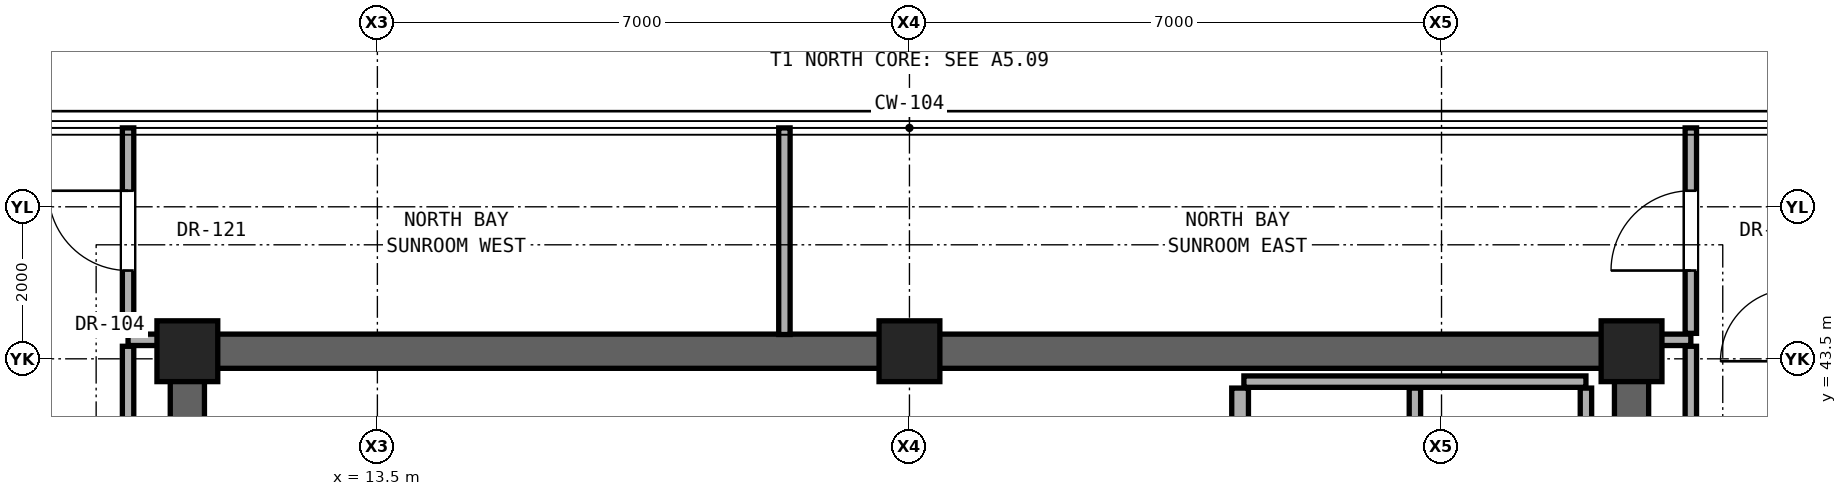
"""IFC4 building model, lengths in metres.
Left out: names, types, materials, properties, quantities, classifications, styles, units other than length and angle.
Written with IfcOpenShell. Run it as: python <this file> out.ifc"""

import sys

from ifc_helpers import new_model, si_unit, direction, frame, frame_2d, origin, origin_2d, place, context, subcontext, project, spatial, rectangle, extrude, element, fill, save


model = new_model("IFC4")
c1 = context("Model", 3, precision=1e-05, world=origin(), true_north=direction((0.0, 1.0)))
c2 = subcontext(c1, "Body", "Model", "MODEL_VIEW")
j1 = project(units=[si_unit("LENGTHUNIT", "METRE"), si_unit("PLANEANGLEUNIT", "RADIAN")], contexts=[c1])
p1 = place(None, origin())
s1 = spatial("IfcSite", under=j1, at=p1, CompositionType="ELEMENT")
p2 = place(p1, origin())
s2 = spatial("IfcBuilding", under=s1, at=p2, CompositionType="ELEMENT")
p3 = place(p2, frame((0.0, 0.0, 222.7)))
s3 = spatial("IfcBuildingStorey", under=s2, at=p3, CompositionType="ELEMENT", Elevation=222.7)
for number, where, z_axis, x_axis in (
    (1, (11.0, 43.6, 0.0), (0.0, 0.0, 1.0), (1.0, 0.0, 0.0)),
    (2, (20.5, 43.6, 0.0), (0.0, 0.0, 1.0), (1.0, 0.0, 0.0)),
    (3, (30.0, 43.6, 0.0), (0.0, 0.0, 1.0), (1.0, 0.0, 0.0)),
):
    element("IfcColumn", number, at=place(p3, frame(where, z_axis=z_axis, x_axis=x_axis)), inside=s3, PredefinedType="COLUMN", context=c2, shape_type="SweptSolid", body=[
        extrude(rectangle(XDim=0.8, YDim=0.8, at=origin_2d()), origin(), (0.0, 0.0, 1.0), 3.3),
    ])
p4 = place(p3, frame((11.0, 43.6, 0.0), z_axis=(0.0, 0.0, 1.0), x_axis=(1.0, 0.0, 0.0)))
e4 = element("IfcWall", 4, at=p4, inside=s3, PredefinedType="SHEAR", context=c2, shape_type="SweptSolid", body=[
    extrude(rectangle(XDim=19.0, YDim=0.45, at=frame_2d((9.5, 0.0))), origin(), (0.0, 0.0, 1.0), 3.1),
])
for number, where, z_axis, x_axis in (
    (5, (11.0, 37.6, 0.0), (0.0, 0.0, 1.0), (0.0, 1.0, 0.0)),
    (6, (30.0, 37.6, 0.0), (0.0, 0.0, 1.0), (0.0, 1.0, 0.0)),
):
    element("IfcWall", number, at=place(p3, frame(where, z_axis=z_axis, x_axis=x_axis)), inside=s3, PredefinedType="SHEAR", context=c2, shape_type="SweptSolid", body=[
        extrude(rectangle(XDim=6.0, YDim=0.45, at=frame_2d((3.0, 0.0))), origin(), (0.0, 0.0, 1.0), 3.1),
    ])
p5 = place(p3, frame((24.9, 43.2, 0.0), z_axis=(0.0, 0.0, 1.0), x_axis=(1.0, 0.0, 0.0)))
e7 = element("IfcWall", 7, at=p5, inside=s3, PredefinedType="PARTITIONING", context=c2, shape_type="SweptSolid", body=[
    extrude(rectangle(XDim=4.5, YDim=0.15, at=frame_2d((2.25, 0.0))), origin(), (0.0, 0.0, 1.0), 3.1),
])
for number, where, z_axis, x_axis in (
    (8, (10.22, 43.75, 0.0), (0.0, 0.0, 1.0), (1.0, 0.0, 0.0)),
    (9, (30.22, 43.75, 0.0), (0.0, 0.0, 1.0), (1.0, 0.0, 0.0)),
):
    element("IfcWall", number, at=place(p3, frame(where, z_axis=z_axis, x_axis=x_axis)), inside=s3, PredefinedType="PARTITIONING", context=c2, shape_type="SweptSolid", body=[
        extrude(rectangle(XDim=0.56, YDim=0.15, at=frame_2d((0.28, 0.0))), origin(), (0.0, 0.0, 1.0), 3.1),
    ])
p6 = place(p3, frame((10.22, 34.535, 0.0), z_axis=(0.0, 0.0, 1.0), x_axis=(0.0, 1.0, 0.0)))
e10 = element("IfcWall", 10, at=p6, inside=s3, PredefinedType="PARTITIONING", context=c2, shape_type="SweptSolid", body=[
    extrude(rectangle(XDim=9.13, YDim=0.15, at=frame_2d((4.565, 0.0))), origin(), (0.0, 0.0, 1.0), 2.492),
])
p7 = place(p3, frame((10.22, 43.835, 0.0), z_axis=(0.0, 0.0, 1.0), x_axis=(0.0, 1.0, 0.0)))
e11 = element("IfcWall", 11, at=p7, inside=s3, PredefinedType="PARTITIONING", context=c2, shape_type="SweptSolid", body=[
    extrude(rectangle(XDim=2.703, YDim=0.15, at=frame_2d((1.352, 0.0))), origin(), (0.0, 0.0, 1.0), 3.1),
])
p8 = place(p7, frame((0.826, 0.0, 0.0)))
e12 = element("IfcOpeningElement", 12, at=p8, cuts=e11, PredefinedType="OPENING", context=c2, shape_type="SweptSolid", body=[
    extrude(rectangle(XDim=1.05, YDim=2.2, at=frame_2d((0.525, 1.1))), frame((0.0, 0.085, 0.0), z_axis=(0.0, -1.0, 0.0), x_axis=(1.0, 0.0, 0.0)), (0.0, 0.0, 1.0), 0.17),
])
p9 = place(p3, frame((18.855, 43.82, 0.0), z_axis=(0.0, 0.0, 1.0), x_axis=(0.0, 1.0, 0.0)))
e13 = element("IfcWall", 13, at=p9, inside=s3, PredefinedType="PARTITIONING", context=c2, shape_type="SweptSolid", body=[
    extrude(rectangle(XDim=2.718, YDim=0.15, at=frame_2d((1.359, 0.0))), origin(), (0.0, 0.0, 1.0), 3.1),
])
p10 = place(p3, frame((24.85, 40.26, 0.0), z_axis=(0.0, 0.0, 1.0), x_axis=(0.0, 1.0, 0.0)))
e14 = element("IfcWall", 14, at=p10, inside=s3, PredefinedType="SOLIDWALL", context=c2, shape_type="SweptSolid", body=[
    extrude(rectangle(XDim=2.855, YDim=0.22, at=frame_2d((1.427, 0.0))), origin(), (0.0, 0.0, 1.0), 3.1),
])
for number, where, z_axis, x_axis in (
    (15, (27.15, 37.82, 0.0), (0.0, 0.0, 1.0), (0.0, 1.0, 0.0)),
    (16, (29.4, 37.82, 0.0), (0.0, 0.0, 1.0), (0.0, 1.0, 0.0)),
):
    element("IfcWall", number, at=place(p3, frame(where, z_axis=z_axis, x_axis=x_axis)), inside=s3, PredefinedType="PARTITIONING", context=c2, shape_type="SweptSolid", body=[
        extrude(rectangle(XDim=5.295, YDim=0.15, at=frame_2d((2.647, 0.0))), origin(), (0.0, 0.0, 1.0), 3.1),
    ])
p11 = place(p3, frame((30.78, 34.57, 0.0), z_axis=(0.0, 0.0, 1.0), x_axis=(0.0, 1.0, 0.0)))
e17 = element("IfcWall", 17, at=p11, inside=s3, PredefinedType="PARTITIONING", context=c2, shape_type="SweptSolid", body=[
    extrude(rectangle(XDim=9.095, YDim=0.15, at=frame_2d((4.547, 0.0))), origin(), (0.0, 0.0, 1.0), 2.492),
])
p12 = place(p3, frame((30.78, 43.835, 0.0), z_axis=(0.0, 0.0, 1.0), x_axis=(0.0, 1.0, 0.0)))
e18 = element("IfcWall", 18, at=p12, inside=s3, PredefinedType="PARTITIONING", context=c2, shape_type="SweptSolid", body=[
    extrude(rectangle(XDim=2.703, YDim=0.15, at=frame_2d((1.352, 0.0))), origin(), (0.0, 0.0, 1.0), 3.1),
])
p13 = place(p12, frame((0.826, 0.0, 0.0)))
e19 = element("IfcOpeningElement", 19, at=p13, cuts=e18, PredefinedType="OPENING", context=c2, shape_type="SweptSolid", body=[
    extrude(rectangle(XDim=1.05, YDim=2.2, at=frame_2d((0.525, 1.1))), frame((0.0, 0.085, 0.0), z_axis=(0.0, -1.0, 0.0), x_axis=(1.0, 0.0, 0.0)), (0.0, 0.0, 1.0), 0.17),
])
p14 = place(p8, origin())
e20 = element("IfcDoor", 20, at=p14, inside=s3, OperationType="SINGLE_SWING_RIGHT", PredefinedType="DOOR", context=c2, shape_type="SweptSolid", body=[
    extrude(rectangle(XDim=1.05, YDim=2.2, at=frame_2d((0.525, 1.1))), frame((0.0, 0.025, 0.0), z_axis=(0.0, -1.0, 0.0), x_axis=(1.0, 0.0, 0.0)), (0.0, 0.0, 1.0), 0.05),
])
fill(e12, e20)
p15 = place(p13, origin())
e21 = element("IfcDoor", 21, at=p15, inside=s3, OperationType="SINGLE_SWING_LEFT", PredefinedType="DOOR", context=c2, shape_type="SweptSolid", body=[
    extrude(rectangle(XDim=1.05, YDim=2.2, at=frame_2d((0.525, 1.1))), frame((0.0, 0.025, 0.0), z_axis=(0.0, -1.0, 0.0), x_axis=(1.0, 0.0, 0.0)), (0.0, 0.0, 1.0), 0.05),
])
fill(e19, e21)
save(model, sys.argv[1])
